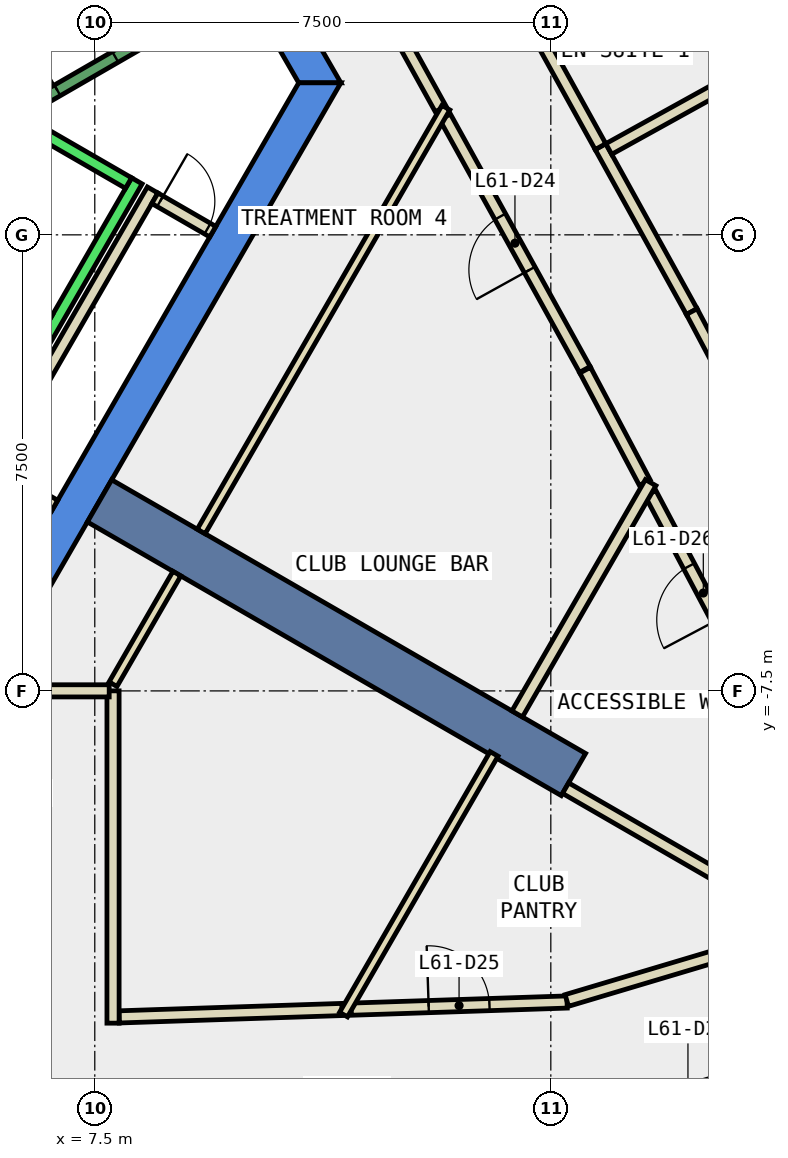
"""IFC4 building model, lengths in metres.
Left out: names, types, materials, properties, quantities, classifications, styles, units other than length and angle.
Written with IfcOpenShell. Run it as: python <this file> out.ifc"""

import sys

from ifc_helpers import new_model, si_unit, direction, frame, frame_2d, origin, place, context, subcontext, project, spatial, polyline, rectangle, outline, extrude, element, fill, save


model = new_model("IFC4")
c1 = context("Model", 3, precision=1e-05, world=origin(), true_north=direction((0.0, 1.0)))
c2 = subcontext(c1, "Body", "Model", "MODEL_VIEW")
j1 = project(units=[si_unit("LENGTHUNIT", "METRE"), si_unit("PLANEANGLEUNIT", "RADIAN")], contexts=[c1])
p1 = place(None, origin())
s1 = spatial("IfcSite", under=j1, at=p1, CompositionType="ELEMENT")
p2 = place(p1, origin())
s2 = spatial("IfcBuilding", under=s1, at=p2, CompositionType="ELEMENT")
p3 = place(p2, frame((0.0, 0.0, 266.6)))
s3 = spatial("IfcBuildingStorey", under=s2, at=p3, CompositionType="ELEMENT", Elevation=266.6)
p4 = place(p3, frame((0.0, 0.0, -0.34)))
e1 = element("IfcWall", 1, at=p4, inside=s3, PredefinedType="SHEAR", context=c2, shape_type="SweptSolid", body=[
    extrude(outline(polyline([(6.786, 10.747), (6.266, 10.447), (10.854, 2.5), (11.547, 2.5), (6.786, 10.747)])), origin(), (0.0, 0.0, 1.0), 3.6),
])
p5 = place(p3, frame((0.0, 0.0, -0.34)))
e2 = element("IfcWall", 2, at=p5, inside=s3, PredefinedType="SHEAR", context=c2, shape_type="SweptSolid", body=[
    extrude(outline(polyline([(5.774, -7.5), (11.547, 2.5), (10.854, 2.5), (5.427, -6.9), (5.774, -7.5)])), origin(), (0.0, 0.0, 1.0), 3.6),
])
p6 = place(p3, frame((7.578, -4.375, -0.34), z_axis=(0.0, 0.0, 1.0), x_axis=(0.866024315419, -0.5000018851, 0.0)))
e3 = element("IfcWall", 3, at=p6, inside=s3, PredefinedType="SHEAR", context=c2, shape_type="SweptSolid", body=[
    extrude(rectangle(XDim=9.0, YDim=0.8, at=frame_2d((4.5, 0.0))), origin(), (0.0, 0.0, 1.0), 3.6),
])
p7 = place(p3, frame((13.188, 2.071, 0.0), z_axis=(0.0, 0.0, 1.0), x_axis=(-0.484398936474, 0.874847226859, 0.0)))
e4 = element("IfcWall", 4, at=p7, inside=s3, PredefinedType="PARTITIONING", context=c2, shape_type="SweptSolid", body=[
    extrude(rectangle(XDim=1.567, YDim=0.2, at=frame_2d((0.783, 0.0))), origin(), (0.0, 0.0, 1.0), 3.26),
])
p8 = place(p3, frame((7.9, -12.861, 0.0), z_axis=(0.0, 0.0, 1.0), x_axis=(0.999446088303, 0.033279371614, 0.0)))
e5 = element("IfcWall", 5, at=p8, inside=s3, PredefinedType="PARTITIONING", context=c2, shape_type="SweptSolid", body=[
    extrude(rectangle(XDim=3.668, YDim=0.2, at=frame_2d((1.834, 0.0))), origin(), (0.0, 0.0, 1.0), 3.26),
])
p9 = place(p3, frame((16.545, -4.074, 0.0), z_axis=(0.0, 0.0, 1.0), x_axis=(-0.468321873419, 0.883557934081, 0.0)))
e6 = element("IfcWall", 6, at=p9, inside=s3, PredefinedType="PARTITIONING", context=c2, shape_type="SweptSolid", body=[
    extrude(rectangle(XDim=2.093, YDim=0.2, at=frame_2d((1.046, 0.0))), origin(), (0.0, 0.0, 1.0), 3.26),
])
p10 = place(p3, frame((15.56, -2.214, 0.0), z_axis=(0.0, 0.0, 1.0), x_axis=(-0.484323615817, 0.874888927329, 0.0)))
e7 = element("IfcWall", 7, at=p10, inside=s3, PredefinedType="PARTITIONING", context=c2, shape_type="SweptSolid", body=[
    extrude(rectangle(XDim=4.747, YDim=0.2, at=frame_2d((2.374, 0.0))), origin(), (0.0, 0.0, 1.0), 3.26),
])
p11 = place(p10, frame((1.874, 0.0, 0.0)))
e8 = element("IfcOpeningElement", 8, at=p11, cuts=e7, PredefinedType="OPENING", context=c2, shape_type="SweptSolid", body=[
    extrude(rectangle(XDim=1.0, YDim=2.1, at=frame_2d((0.5, 1.05))), frame((0.0, 0.11, 0.0), z_axis=(0.0, -1.0, 0.0), x_axis=(1.0, 0.0, 0.0)), (0.0, 0.0, 1.0), 0.22),
])
p12 = place(p3, frame((11.716, -12.734, 0.0), z_axis=(0.0, 0.0, 1.0), x_axis=(0.999449093602, 0.03318899362, 0.0)))
e9 = element("IfcWall", 9, at=p12, inside=s3, PredefinedType="PARTITIONING", context=c2, shape_type="SweptSolid", body=[
    extrude(rectangle(XDim=3.553, YDim=0.2, at=frame_2d((1.776, 0.0))), origin(), (0.0, 0.0, 1.0), 3.26),
])
p13 = place(p12, frame((1.276, 0.0, 0.0)))
e10 = element("IfcOpeningElement", 10, at=p13, cuts=e9, PredefinedType="OPENING", context=c2, shape_type="SweptSolid", body=[
    extrude(rectangle(XDim=1.0, YDim=2.1, at=frame_2d((0.5, 1.05))), frame((0.0, 0.11, 0.0), z_axis=(0.0, -1.0, 0.0), x_axis=(1.0, 0.0, 0.0)), (0.0, 0.0, 1.0), 0.22),
])
p14 = place(p3, frame((15.263, -12.591, 0.0), z_axis=(0.0, 0.0, 1.0), x_axis=(0.958253964342, 0.285918414628, 0.0)))
e11 = element("IfcWall", 11, at=p14, inside=s3, PredefinedType="PARTITIONING", context=c2, shape_type="SweptSolid", body=[
    extrude(rectangle(XDim=2.743, YDim=0.2, at=frame_2d((1.371, 0.0))), origin(), (0.0, 0.0, 1.0), 3.26),
])
p15 = place(p3, frame((18.377, -7.53, 0.0), z_axis=(0.0, 0.0, 1.0), x_axis=(-0.468214048123, 0.883615077474, 0.0)))
e12 = element("IfcWall", 12, at=p15, inside=s3, PredefinedType="PARTITIONING", context=c2, shape_type="SweptSolid", body=[
    extrude(rectangle(XDim=3.712, YDim=0.2, at=frame_2d((1.856, 0.0))), origin(), (0.0, 0.0, 1.0), 3.26),
])
p16 = place(p15, frame((1.356, 0.0, 0.0)))
e13 = element("IfcOpeningElement", 13, at=p16, cuts=e12, PredefinedType="OPENING", context=c2, shape_type="SweptSolid", body=[
    extrude(rectangle(XDim=1.0, YDim=2.1, at=frame_2d((0.5, 1.05))), frame((0.0, 0.11, 0.0), z_axis=(0.0, -1.0, 0.0), x_axis=(1.0, 0.0, 0.0)), (0.0, 0.0, 1.0), 0.22),
])
p17 = place(p3, frame((18.924, -13.587, 0.0), z_axis=(0.0, 0.0, 1.0), x_axis=(-0.958378336681, -0.285501250052, 0.0)))
e14 = element("IfcWall", 14, at=p17, inside=s3, PredefinedType="PARTITIONING", context=c2, shape_type="SweptSolid", body=[
    extrude(rectangle(XDim=3.482, YDim=0.2, at=frame_2d((1.741, 0.0))), origin(), (0.0, 0.0, 1.0), 3.26),
])
p18 = place(p17, frame((0.841, 0.0, 0.0)))
e15 = element("IfcOpeningElement", 15, at=p18, cuts=e14, PredefinedType="OPENING", context=c2, shape_type="SweptSolid", body=[
    extrude(rectangle(XDim=1.8, YDim=2.1, at=frame_2d((0.9, 1.05))), frame((0.0, 0.11, 0.0), z_axis=(0.0, -1.0, 0.0), x_axis=(1.0, 0.0, 0.0)), (0.0, 0.0, 1.0), 0.22),
])
p19 = place(p3, frame((15.817, 1.451, 0.0), z_axis=(0.0, 0.0, 1.0), x_axis=(0.48417811398, -0.874969458863, 0.0)))
e16 = element("IfcWall", 16, at=p19, inside=s3, PredefinedType="PARTITIONING", context=c2, shape_type="SweptSolid", body=[
    extrude(rectangle(XDim=3.101, YDim=0.2, at=frame_2d((1.55, 0.0))), origin(), (0.0, 0.0, 1.0), 3.26),
])
p20 = place(p3, frame((17.318, -1.262, 0.0), z_axis=(0.0, 0.0, 1.0), x_axis=(0.468313568794, -0.883562335822, 0.0)))
e17 = element("IfcWall", 17, at=p20, inside=s3, PredefinedType="PARTITIONING", context=c2, shape_type="SweptSolid", body=[
    extrude(rectangle(XDim=6.216, YDim=0.2, at=frame_2d((3.108, 0.0))), origin(), (0.0, 0.0, 1.0), 3.26),
])
p21 = place(p20, frame((2.608, 0.0, 0.0)))
e18 = element("IfcOpeningElement", 18, at=p21, cuts=e17, PredefinedType="OPENING", context=c2, shape_type="SweptSolid", body=[
    extrude(rectangle(XDim=1.0, YDim=2.1, at=frame_2d((0.5, 1.05))), frame((0.0, 0.11, 0.0), z_axis=(0.0, -1.0, 0.0), x_axis=(1.0, 0.0, 0.0)), (0.0, 0.0, 1.0), 0.22),
])
p22 = place(p3, frame((14.267, 4.25, 0.0), z_axis=(0.0, 0.0, 1.0), x_axis=(0.4843920198, -0.874851056554, 0.0)))
e19 = element("IfcWall", 19, at=p22, inside=s3, PredefinedType="PARTITIONING", context=c2, shape_type="SweptSolid", body=[
    extrude(rectangle(XDim=3.199, YDim=0.2, at=frame_2d((1.6, 0.0))), origin(), (0.0, 0.0, 1.0), 3.26),
])
p23 = place(p3, frame((5.751, -3.938, 0.0), z_axis=(0.0, 0.0, 1.0), x_axis=(0.500034260056, 0.866005622828, 0.0)))
e20 = element("IfcWall", 20, at=p23, inside=s3, PredefinedType="PARTITIONING", context=c2, shape_type="SweptSolid", body=[
    extrude(rectangle(XDim=5.399, YDim=0.2, at=frame_2d((2.7, 0.0))), origin(), (0.0, 0.0, 1.0), 3.26),
])
p24 = place(p3, frame((8.488, 0.602, 0.0), z_axis=(0.0, 0.0, 1.0), x_axis=(0.866063652425, -0.499933745558, 0.0)))
e21 = element("IfcWall", 21, at=p24, inside=s3, PredefinedType="PARTITIONING", context=c2, shape_type="SweptSolid", body=[
    extrude(rectangle(XDim=1.1, YDim=0.2, at=frame_2d((0.55, 0.0))), origin(), (0.0, 0.0, 1.0), 3.26),
])
p25 = place(p24, frame((0.1, 0.0, 0.0)))
e22 = element("IfcOpeningElement", 22, at=p25, cuts=e21, PredefinedType="OPENING", context=c2, shape_type="SweptSolid", body=[
    extrude(rectangle(XDim=0.9, YDim=2.1, at=frame_2d((0.45, 1.05))), frame((0.0, 0.11, 0.0), z_axis=(0.0, -1.0, 0.0), x_axis=(1.0, 0.0, 0.0)), (0.0, 0.0, 1.0), 0.22),
])
p26 = place(p3, frame((6.841, -4.452, 0.0), z_axis=(0.0, 0.0, 1.0), x_axis=(-0.86621513555, 0.499671230855, 0.0)))
e23 = element("IfcWall", 23, at=p26, inside=s3, PredefinedType="PARTITIONING", context=c2, shape_type="SweptSolid", body=[
    extrude(rectangle(XDim=1.1, YDim=0.2, at=frame_2d((0.55, 0.0))), origin(), (0.0, 0.0, 1.0), 3.26),
])
p27 = place(p3, frame((7.8, -7.39, 0.0), z_axis=(0.0, 0.0, 1.0), x_axis=(0.499977374825, 0.866038466041, 0.0)))
e24 = element("IfcWall", 24, at=p27, inside=s3, PredefinedType="PARTITIONING", context=c2, shape_type="SweptSolid", body=[
    extrude(rectangle(XDim=2.1, YDim=0.15, at=frame_2d((1.05, 0.0))), origin(), (0.0, 0.0, 1.0), 3.26),
])
p28 = place(p3, frame((7.8, -7.499, 0.0), z_axis=(0.0, 0.0, 1.0), x_axis=(0.0, -1.0, 0.0)))
e25 = element("IfcWall", 25, at=p28, inside=s3, PredefinedType="PARTITIONING", context=c2, shape_type="SweptSolid", body=[
    extrude(rectangle(XDim=5.465, YDim=0.2, at=frame_2d((2.732, 0.0))), origin(), (0.0, 0.0, 1.0), 3.26),
])
p29 = place(p3, frame((14.067, -8.536, 0.0), z_axis=(0.0, 0.0, 1.0), x_axis=(-0.500100941679, -0.865967117235, 0.0)))
e26 = element("IfcWall", 26, at=p29, inside=s3, PredefinedType="PARTITIONING", context=c2, shape_type="SweptSolid", body=[
    extrude(rectangle(XDim=4.951, YDim=0.15, at=frame_2d((2.475, 0.0))), origin(), (0.0, 0.0, 1.0), 3.26),
])
p30 = place(p3, frame((16.642, -4.075, 0.0), z_axis=(0.0, 0.0, 1.0), x_axis=(-0.49980426207, -0.866138383641, 0.0)))
e27 = element("IfcWall", 27, at=p30, inside=s3, PredefinedType="PARTITIONING", context=c2, shape_type="SweptSolid", body=[
    extrude(rectangle(XDim=4.392, YDim=0.2, at=frame_2d((2.196, 0.0))), origin(), (0.0, 0.0, 1.0), 3.26),
])
p31 = place(p3, frame((15.243, -9.099, 0.0), z_axis=(0.0, 0.0, 1.0), x_axis=(0.866026010844, -0.49999894854, 0.0)))
e28 = element("IfcWall", 28, at=p31, inside=s3, PredefinedType="PARTITIONING", context=c2, shape_type="SweptSolid", body=[
    extrude(rectangle(XDim=4.0, YDim=0.2, at=frame_2d((2.0, 0.0))), origin(), (0.0, 0.0, 1.0), 3.26),
])
p32 = place(p3, frame((15.953, 1.412, 0.0), z_axis=(0.0, 0.0, 1.0), x_axis=(0.875014790305, 0.484096185429, 0.0)))
e29 = element("IfcWall", 29, at=p32, inside=s3, PredefinedType="PARTITIONING", context=c2, shape_type="SweptSolid", body=[
    extrude(rectangle(XDim=2.4, YDim=0.2, at=frame_2d((1.2, 0.0))), origin(), (0.0, 0.0, 1.0), 3.26),
])
p33 = place(p3, frame((18.189, 2.535, 0.0), z_axis=(0.0, 0.0, 1.0), x_axis=(-0.484447408253, 0.874820386501, 0.0)))
e30 = element("IfcWall", 30, at=p33, inside=s3, PredefinedType="PARTITIONING", context=c2, shape_type="SweptSolid", body=[
    extrude(rectangle(XDim=3.4, YDim=0.2, at=frame_2d((1.7, 0.0))), origin(), (0.0, 0.0, 1.0), 3.26),
])
p34 = place(p33, frame((1.25, 0.0, 0.0)))
e31 = element("IfcOpeningElement", 31, at=p34, cuts=e30, PredefinedType="OPENING", context=c2, shape_type="SweptSolid", body=[
    extrude(rectangle(XDim=0.9, YDim=2.1, at=frame_2d((0.45, 1.05))), frame((0.0, 0.11, 0.0), z_axis=(0.0, -1.0, 0.0), x_axis=(1.0, 0.0, 0.0)), (0.0, 0.0, 1.0), 0.22),
])
p35 = place(p3, frame((9.25, -4.878, 0.0), z_axis=(0.0, 0.0, 1.0), x_axis=(0.499982416899, 0.866035555154, 0.0)))
e32 = element("IfcWall", 32, at=p35, inside=s3, PredefinedType="PARTITIONING", context=c2, shape_type="SweptSolid", body=[
    extrude(rectangle(XDim=8.048, YDim=0.15, at=frame_2d((4.024, 0.0))), origin(), (0.0, 0.0, 1.0), 3.26),
])
p36 = place(p3, frame((5.944, -7.499, 0.0), z_axis=(0.0, 0.0, 1.0), x_axis=(1.0, 0.0, 0.0)))
e33 = element("IfcWall", 33, at=p36, inside=s3, PredefinedType="PARTITIONING", context=c2, shape_type="SweptSolid", body=[
    extrude(rectangle(XDim=1.793, YDim=0.2, at=frame_2d((0.896, 0.0))), origin(), (0.0, 0.0, 1.0), 3.26),
])
p37 = place(p3, frame((5.492, -3.788, 0.0), z_axis=(0.0, 0.0, 1.0), x_axis=(0.500034260056, 0.866005622828, 0.0)))
e34 = element("IfcWall", 34, at=p37, inside=s3, PredefinedType="STANDARD", context=c2, shape_type="SweptSolid", body=[
    extrude(rectangle(XDim=5.399, YDim=0.2, at=frame_2d((2.7, 0.0))), origin(), (0.0, 0.0, 1.0), 3.26),
])
for number, where, z_axis, x_axis in (
    (35, (4.677, -0.2, 0.0), (0.0, 0.0, 1.0), (0.866, -0.5, 0.0)),
    (36, (5.977, 2.052, 0.0), (0.0, 0.0, 1.0), (0.866, -0.5, 0.0)),
):
    element("IfcWall", number, at=place(p3, frame(where, z_axis=z_axis, x_axis=x_axis)), inside=s3, PredefinedType="STANDARD", context=c2, shape_type="SweptSolid", body=[
        extrude(rectangle(XDim=2.399, YDim=0.2, at=frame_2d((1.2, 0.0))), origin(), (0.0, 0.0, 1.0), 3.26),
    ])
p38 = place(p3, frame((4.806, 1.176, 0.0), z_axis=(0.0, 0.0, 1.0), x_axis=(0.866059941101, 0.499940174841, 0.0)))
e37 = element("IfcWall", 37, at=p38, inside=s3, PredefinedType="STANDARD", context=c2, shape_type="SweptSolid", body=[
    extrude(rectangle(XDim=4.4, YDim=0.2, at=frame_2d((2.2, 0.0))), origin(), (0.0, 0.0, 1.0), 3.26),
])
p39 = place(p38, frame((2.4, 0.0, 0.0)))
e38 = element("IfcOpeningElement", 38, at=p39, cuts=e37, PredefinedType="OPENING", context=c2, shape_type="SweptSolid", body=[
    extrude(rectangle(XDim=1.1, YDim=2.2, at=frame_2d((0.55, 1.1))), frame((0.0, 0.11, 0.0), z_axis=(0.0, -1.0, 0.0), x_axis=(1.0, 0.0, 0.0)), (0.0, 0.0, 1.0), 0.22),
])
p40 = place(p18, origin())
e39 = element("IfcDoor", 39, at=p40, inside=s3, OperationType="DOUBLE_DOOR_SINGLE_SWING", PredefinedType="DOOR", context=c2, shape_type="SweptSolid", body=[
    extrude(rectangle(XDim=1.8, YDim=2.1, at=frame_2d((0.9, 1.05))), frame((0.0, 0.025, 0.0), z_axis=(0.0, -1.0, 0.0), x_axis=(1.0, 0.0, 0.0)), (0.0, 0.0, 1.0), 0.05),
])
fill(e15, e39)
p41 = place(p11, origin())
e40 = element("IfcDoor", 40, at=p41, inside=s3, OperationType="SINGLE_SWING_LEFT", PredefinedType="DOOR", context=c2, shape_type="SweptSolid", body=[
    extrude(rectangle(XDim=1.0, YDim=2.1, at=frame_2d((0.5, 1.05))), frame((0.0, 0.025, 0.0), z_axis=(0.0, -1.0, 0.0), x_axis=(1.0, 0.0, 0.0)), (0.0, 0.0, 1.0), 0.05),
])
fill(e8, e40)
p42 = place(p13, origin())
e41 = element("IfcDoor", 41, at=p42, inside=s3, OperationType="SINGLE_SWING_LEFT", PredefinedType="DOOR", context=c2, shape_type="SweptSolid", body=[
    extrude(rectangle(XDim=1.0, YDim=2.1, at=frame_2d((0.5, 1.05))), frame((0.0, 0.025, 0.0), z_axis=(0.0, -1.0, 0.0), x_axis=(1.0, 0.0, 0.0)), (0.0, 0.0, 1.0), 0.05),
])
fill(e10, e41)
p43 = place(p16, origin())
e42 = element("IfcDoor", 42, at=p43, inside=s3, OperationType="SINGLE_SWING_RIGHT", PredefinedType="DOOR", context=c2, shape_type="SweptSolid", body=[
    extrude(rectangle(XDim=1.0, YDim=2.1, at=frame_2d((0.5, 1.05))), frame((0.0, 0.025, 0.0), z_axis=(0.0, -1.0, 0.0), x_axis=(1.0, 0.0, 0.0)), (0.0, 0.0, 1.0), 0.05),
])
fill(e13, e42)
p44 = place(p25, origin())
e43 = element("IfcDoor", 43, at=p44, inside=s3, OperationType="SINGLE_SWING_RIGHT", PredefinedType="DOOR", context=c2, shape_type="SweptSolid", body=[
    extrude(rectangle(XDim=0.9, YDim=2.1, at=frame_2d((0.45, 1.05))), frame((0.0, 0.025, 0.0), z_axis=(0.0, -1.0, 0.0), x_axis=(1.0, 0.0, 0.0)), (0.0, 0.0, 1.0), 0.05),
])
fill(e22, e43)
p45 = place(p39, origin())
e44 = element("IfcDoor", 44, at=p45, inside=s3, OperationType="SINGLE_SWING_LEFT", PredefinedType="DOOR", context=c2, shape_type="SweptSolid", body=[
    extrude(rectangle(XDim=1.1, YDim=2.2, at=frame_2d((0.55, 1.1))), frame((0.0, 0.025, 0.0), z_axis=(0.0, -1.0, 0.0), x_axis=(1.0, 0.0, 0.0)), (0.0, 0.0, 1.0), 0.05),
])
fill(e38, e44)
save(model, sys.argv[1])
